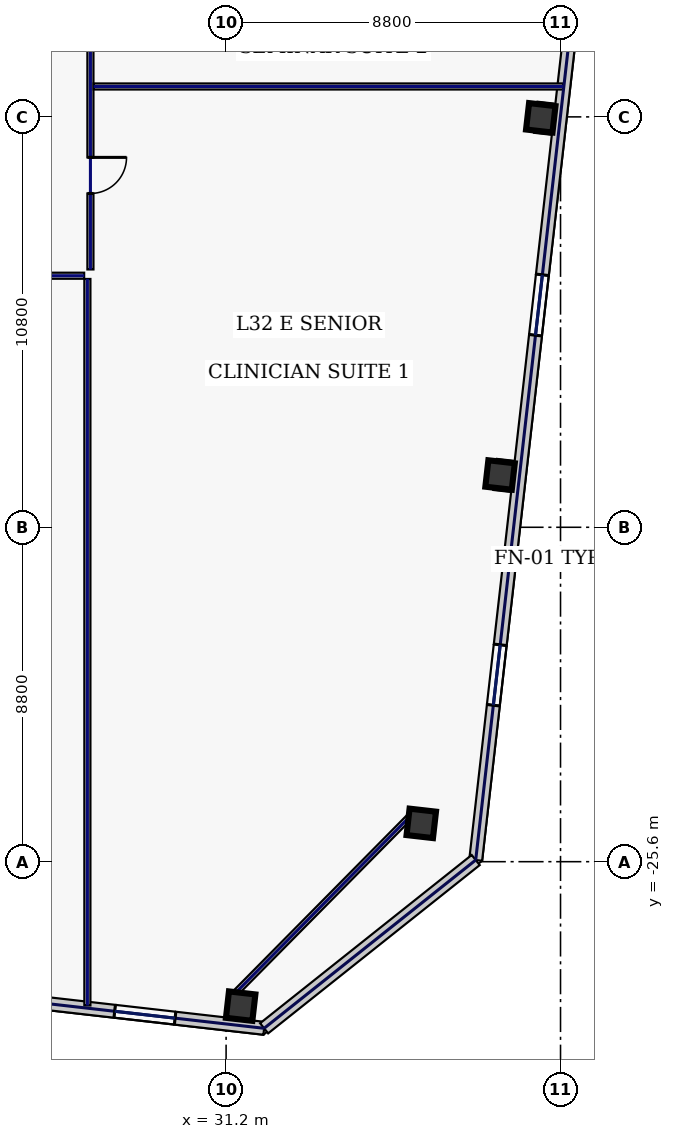
"""IFC4 building model, lengths in metres.
Left out: names, types, materials, properties, quantities, classifications, styles, units other than length and angle.
Written with IfcOpenShell. Run it as: python <this file> out.ifc"""

import sys

from ifc_helpers import new_model, si_unit, direction, frame, frame_2d, origin, origin_2d, place, context, subcontext, project, spatial, rectangle, hollow_rectangle, extrude, element, fill, save


model = new_model("IFC4")
c1 = context("Model", 3, precision=1e-05, world=origin(), true_north=direction((0.0, 1.0)))
c2 = subcontext(c1, "Body", "Model", "MODEL_VIEW")
j1 = project(units=[si_unit("LENGTHUNIT", "METRE"), si_unit("PLANEANGLEUNIT", "RADIAN")], contexts=[c1])
p1 = place(None, origin())
s1 = spatial("IfcSite", under=j1, at=p1, CompositionType="ELEMENT")
p2 = place(p1, origin())
s2 = spatial("IfcBuilding", under=s1, at=p2, CompositionType="ELEMENT")
p3 = place(p2, frame((0.0, 0.0, 141.4)))
s3 = spatial("IfcBuildingStorey", under=s2, at=p3, CompositionType="ELEMENT", Elevation=141.4)
for number, where, z_axis, x_axis in (
    (1, (31.583, -29.401, 0.0), (0.0, 0.0, 1.0), (0.994, -0.113, 0.0)),
    (2, (36.336, -24.592, 0.0), (0.0, 0.0, 1.0), (0.994, -0.113, 0.0)),
    (3, (38.409, -15.424, 0.0), (0.0, 0.0, 1.0), (0.994, -0.113, 0.0)),
    (4, (39.48, -6.025, 0.0), (0.0, 0.0, 1.0), (0.994, -0.113, 0.0)),
):
    element("IfcColumn", number, at=place(p3, frame(where, z_axis=z_axis, x_axis=x_axis)), inside=s3, PredefinedType="COLUMN", context=c2, shape_type="SweptSolid", body=[
        extrude(hollow_rectangle(XDim=0.7, YDim=0.7, WallThickness=0.032, at=origin_2d()), origin(), (0.0, 0.0, 1.0), 4.48),
    ])
p4 = place(p3, frame((11.81, -27.662, 0.0), z_axis=(0.0, 0.0, 1.0), x_axis=(0.993573214953, -0.113191282914, 0.0)))
e5 = element("IfcWall", 5, at=p4, inside=s3, PredefinedType="STANDARD", context=c2, shape_type="SweptSolid", body=[
    extrude(rectangle(XDim=20.523, YDim=0.34, at=frame_2d((10.261, 0.0))), origin(), (0.0, 0.0, 1.0), 4.48),
])
p5 = place(p4, frame((3.167, 0.0, 0.22)))
e6 = element("IfcOpeningElement", 6, at=p5, cuts=e5, PredefinedType="OPENING", context=c2, shape_type="SweptSolid", body=[
    extrude(rectangle(XDim=1.6, YDim=1.2, at=frame_2d((0.8, 0.6))), frame((0.0, 0.18, 0.0), z_axis=(0.0, -1.0, 0.0), x_axis=(1.0, 0.0, 0.0)), (0.0, 0.0, 1.0), 0.36),
])
p6 = place(p4, frame((12.344, 0.0, 0.22)))
e7 = element("IfcOpeningElement", 7, at=p6, cuts=e5, PredefinedType="OPENING", context=c2, shape_type="SweptSolid", body=[
    extrude(rectangle(XDim=1.6, YDim=1.2, at=frame_2d((0.8, 0.6))), frame((0.0, 0.18, 0.0), z_axis=(0.0, -1.0, 0.0), x_axis=(1.0, 0.0, 0.0)), (0.0, 0.0, 1.0), 0.36),
])
p7 = place(p4, frame((16.565, 0.0, 0.22)))
e8 = element("IfcOpeningElement", 8, at=p7, cuts=e5, PredefinedType="OPENING", context=c2, shape_type="SweptSolid", body=[
    extrude(rectangle(XDim=1.6, YDim=1.2, at=frame_2d((0.8, 0.6))), frame((0.0, 0.18, 0.0), z_axis=(0.0, -1.0, 0.0), x_axis=(1.0, 0.0, 0.0)), (0.0, 0.0, 1.0), 0.36),
])
p8 = place(p3, frame((37.768, -25.556, 0.0), z_axis=(0.0, 0.0, 1.0), x_axis=(0.113201605824, 0.993572038877, 0.0)))
e9 = element("IfcWall", 9, at=p8, inside=s3, PredefinedType="STANDARD", context=c2, shape_type="SweptSolid", body=[
    extrude(rectangle(XDim=39.2, YDim=0.34, at=frame_2d((19.6, 0.0))), origin(), (0.0, 0.0, 1.0), 4.48),
])
p9 = place(p8, frame((4.1, 0.0, 0.22)))
e10 = element("IfcOpeningElement", 10, at=p9, cuts=e9, PredefinedType="OPENING", context=c2, shape_type="SweptSolid", body=[
    extrude(rectangle(XDim=1.6, YDim=1.2, at=frame_2d((0.8, 0.6))), frame((0.0, 0.18, 0.0), z_axis=(0.0, -1.0, 0.0), x_axis=(1.0, 0.0, 0.0)), (0.0, 0.0, 1.0), 0.36),
])
p10 = place(p8, frame((13.9, 0.0, 0.22)))
e11 = element("IfcOpeningElement", 11, at=p10, cuts=e9, PredefinedType="OPENING", context=c2, shape_type="SweptSolid", body=[
    extrude(rectangle(XDim=1.6, YDim=1.2, at=frame_2d((0.8, 0.6))), frame((0.0, 0.18, 0.0), z_axis=(0.0, -1.0, 0.0), x_axis=(1.0, 0.0, 0.0)), (0.0, 0.0, 1.0), 0.36),
])
p11 = place(p8, frame((33.5, 0.0, 0.22)))
e12 = element("IfcOpeningElement", 12, at=p11, cuts=e9, PredefinedType="OPENING", context=c2, shape_type="SweptSolid", body=[
    extrude(rectangle(XDim=1.6, YDim=1.2, at=frame_2d((0.8, 0.6))), frame((0.0, 0.18, 0.0), z_axis=(0.0, -1.0, 0.0), x_axis=(1.0, 0.0, 0.0)), (0.0, 0.0, 1.0), 0.36),
])
p12 = place(p3, frame((32.201, -29.985, 0.0), z_axis=(0.0, 0.0, 1.0), x_axis=(0.78261359446, 0.622507800567, 0.0)))
e13 = element("IfcWall", 13, at=p12, inside=s3, PredefinedType="STANDARD", context=c2, shape_type="SweptSolid", body=[
    extrude(rectangle(XDim=7.114, YDim=0.34, at=frame_2d((3.557, 0.0))), origin(), (0.0, 0.0, 1.0), 4.48),
])
p13 = place(p3, frame((31.341, -29.162, 0.0), z_axis=(0.0, 0.0, 1.0), x_axis=(0.702905898933, 0.711282853192, 0.0)))
e14 = element("IfcWall", 14, at=p13, inside=s3, PredefinedType="PARTITIONING", context=c2, shape_type="SweptSolid", body=[
    extrude(rectangle(XDim=6.761, YDim=0.16, at=frame_2d((3.381, 0.0))), origin(), (0.0, 0.0, 1.0), 2.275),
])
p14 = place(p3, frame((27.63, 10.115, 0.0), z_axis=(0.0, 0.0, 1.0), x_axis=(0.0, -1.0, 0.0)))
e15 = element("IfcWall", 15, at=p14, inside=s3, PredefinedType="PARTITIONING", context=c2, shape_type="SweptSolid", body=[
    extrude(rectangle(XDim=20.13, YDim=0.16, at=frame_2d((10.065, 0.0))), origin(), (0.0, 0.0, 1.0), 4.48),
])
p15 = place(p14, frame((17.181, 0.0, 0.0)))
e16 = element("IfcOpeningElement", 16, at=p15, cuts=e15, PredefinedType="OPENING", context=c2, shape_type="SweptSolid", body=[
    extrude(rectangle(XDim=0.95, YDim=2.2, at=frame_2d((0.475, 1.1))), frame((0.0, 0.09, 0.0), z_axis=(0.0, -1.0, 0.0), x_axis=(1.0, 0.0, 0.0)), (0.0, 0.0, 1.0), 0.18),
])
p16 = place(p14, frame((12.95, 0.0, 0.0)))
e17 = element("IfcOpeningElement", 17, at=p16, cuts=e15, PredefinedType="OPENING", context=c2, shape_type="SweptSolid", body=[
    extrude(rectangle(XDim=0.95, YDim=2.2, at=frame_2d((0.475, 1.1))), frame((0.0, 0.09, 0.0), z_axis=(0.0, -1.0, 0.0), x_axis=(1.0, 0.0, 0.0)), (0.0, 0.0, 1.0), 0.18),
])
p17 = place(p14, frame((7.45, 0.0, 0.0)))
e18 = element("IfcOpeningElement", 18, at=p17, cuts=e15, PredefinedType="OPENING", context=c2, shape_type="SweptSolid", body=[
    extrude(rectangle(XDim=0.95, YDim=2.2, at=frame_2d((0.475, 1.1))), frame((0.0, 0.09, 0.0), z_axis=(0.0, -1.0, 0.0), x_axis=(1.0, 0.0, 0.0)), (0.0, 0.0, 1.0), 0.18),
])
p18 = place(p14, frame((2.219, 0.0, 0.0)))
e19 = element("IfcOpeningElement", 19, at=p18, cuts=e15, PredefinedType="OPENING", context=c2, shape_type="SweptSolid", body=[
    extrude(rectangle(XDim=0.95, YDim=2.2, at=frame_2d((0.475, 1.1))), frame((0.0, 0.09, 0.0), z_axis=(0.0, -1.0, 0.0), x_axis=(1.0, 0.0, 0.0)), (0.0, 0.0, 1.0), 0.18),
])
p19 = place(p3, frame((27.465, -10.18, 0.0), z_axis=(0.0, 0.0, 1.0), x_axis=(-1.0, 0.0, 0.0)))
e20 = element("IfcWall", 20, at=p19, inside=s3, PredefinedType="PARTITIONING", context=c2, shape_type="SweptSolid", body=[
    extrude(rectangle(XDim=54.93, YDim=0.16, at=frame_2d((27.465, 0.0))), origin(), (0.0, 0.0, 1.0), 4.48),
])
p20 = place(p19, frame((51.931, 0.0, 0.0)))
e21 = element("IfcOpeningElement", 21, at=p20, cuts=e20, PredefinedType="OPENING", context=c2, shape_type="SweptSolid", body=[
    extrude(rectangle(XDim=1.3, YDim=2.2, at=frame_2d((0.65, 1.1))), frame((0.0, 0.09, 0.0), z_axis=(0.0, -1.0, 0.0), x_axis=(1.0, 0.0, 0.0)), (0.0, 0.0, 1.0), 0.18),
])
p21 = place(p19, frame((45.225, 0.0, 0.0)))
e22 = element("IfcOpeningElement", 22, at=p21, cuts=e20, PredefinedType="OPENING", context=c2, shape_type="SweptSolid", body=[
    extrude(rectangle(XDim=0.95, YDim=2.2, at=frame_2d((0.475, 1.1))), frame((0.0, 0.09, 0.0), z_axis=(0.0, -1.0, 0.0), x_axis=(1.0, 0.0, 0.0)), (0.0, 0.0, 1.0), 0.18),
])
p22 = place(p19, frame((36.525, 0.0, 0.0)))
e23 = element("IfcOpeningElement", 23, at=p22, cuts=e20, PredefinedType="OPENING", context=c2, shape_type="SweptSolid", body=[
    extrude(rectangle(XDim=0.95, YDim=2.2, at=frame_2d((0.475, 1.1))), frame((0.0, 0.09, 0.0), z_axis=(0.0, -1.0, 0.0), x_axis=(1.0, 0.0, 0.0)), (0.0, 0.0, 1.0), 0.18),
])
p23 = place(p19, frame((28.125, 0.0, 0.0)))
e24 = element("IfcOpeningElement", 24, at=p23, cuts=e20, PredefinedType="OPENING", context=c2, shape_type="SweptSolid", body=[
    extrude(rectangle(XDim=0.95, YDim=2.2, at=frame_2d((0.475, 1.1))), frame((0.0, 0.09, 0.0), z_axis=(0.0, -1.0, 0.0), x_axis=(1.0, 0.0, 0.0)), (0.0, 0.0, 1.0), 0.18),
])
p24 = place(p19, frame((19.325, 0.0, 0.0)))
e25 = element("IfcOpeningElement", 25, at=p24, cuts=e20, PredefinedType="OPENING", context=c2, shape_type="SweptSolid", body=[
    extrude(rectangle(XDim=0.95, YDim=2.2, at=frame_2d((0.475, 1.1))), frame((0.0, 0.09, 0.0), z_axis=(0.0, -1.0, 0.0), x_axis=(1.0, 0.0, 0.0)), (0.0, 0.0, 1.0), 0.18),
])
p25 = place(p19, frame((10.75, 0.0, 0.0)))
e26 = element("IfcOpeningElement", 26, at=p25, cuts=e20, PredefinedType="OPENING", context=c2, shape_type="SweptSolid", body=[
    extrude(rectangle(XDim=1.3, YDim=2.2, at=frame_2d((0.65, 1.1))), frame((0.0, 0.09, 0.0), z_axis=(0.0, -1.0, 0.0), x_axis=(1.0, 0.0, 0.0)), (0.0, 0.0, 1.0), 0.18),
])
p26 = place(p19, frame((3.394, 0.0, 0.0)))
e27 = element("IfcOpeningElement", 27, at=p26, cuts=e20, PredefinedType="OPENING", context=c2, shape_type="SweptSolid", body=[
    extrude(rectangle(XDim=1.15, YDim=2.2, at=frame_2d((0.575, 1.1))), frame((0.0, 0.09, 0.0), z_axis=(0.0, -1.0, 0.0), x_axis=(1.0, 0.0, 0.0)), (0.0, 0.0, 1.0), 0.18),
])
p27 = place(p3, frame((27.55, -29.385, 0.0), z_axis=(0.0, 0.0, 1.0), x_axis=(0.0, 1.0, 0.0)))
e28 = element("IfcWall", 28, at=p27, inside=s3, PredefinedType="PARTITIONING", context=c2, shape_type="SweptSolid", body=[
    extrude(rectangle(XDim=19.12, YDim=0.16, at=frame_2d((9.56, 0.0))), origin(), (0.0, 0.0, 1.0), 4.48),
])
p28 = place(p3, frame((27.715, -5.2, 0.0), z_axis=(0.0, 0.0, 1.0), x_axis=(1.0, 0.0, 0.0)))
e29 = element("IfcWall", 29, at=p28, inside=s3, PredefinedType="PARTITIONING", context=c2, shape_type="SweptSolid", body=[
    extrude(rectangle(XDim=12.352, YDim=0.16, at=frame_2d((6.176, 0.0))), origin(), (0.0, 0.0, 1.0), 4.48),
])
p29 = place(p7, origin())
e30 = element("IfcWindow", 30, at=p29, inside=s3, PartitioningType="SINGLE_PANEL", PredefinedType="WINDOW", context=c2, shape_type="SweptSolid", body=[
    extrude(rectangle(XDim=1.6, YDim=1.2, at=frame_2d((0.8, 0.6))), frame((0.0, 0.03, 0.0), z_axis=(0.0, -1.0, 0.0), x_axis=(1.0, 0.0, 0.0)), (0.0, 0.0, 1.0), 0.06),
])
fill(e8, e30)
p30 = place(p9, origin())
e31 = element("IfcWindow", 31, at=p30, inside=s3, PartitioningType="SINGLE_PANEL", PredefinedType="WINDOW", context=c2, shape_type="SweptSolid", body=[
    extrude(rectangle(XDim=1.6, YDim=1.2, at=frame_2d((0.8, 0.6))), frame((0.0, 0.03, 0.0), z_axis=(0.0, -1.0, 0.0), x_axis=(1.0, 0.0, 0.0)), (0.0, 0.0, 1.0), 0.06),
])
fill(e10, e31)
p31 = place(p10, origin())
e32 = element("IfcWindow", 32, at=p31, inside=s3, PartitioningType="SINGLE_PANEL", PredefinedType="WINDOW", context=c2, shape_type="SweptSolid", body=[
    extrude(rectangle(XDim=1.6, YDim=1.2, at=frame_2d((0.8, 0.6))), frame((0.0, 0.03, 0.0), z_axis=(0.0, -1.0, 0.0), x_axis=(1.0, 0.0, 0.0)), (0.0, 0.0, 1.0), 0.06),
])
fill(e11, e32)
p32 = place(p15, origin())
e33 = element("IfcDoor", 33, at=p32, inside=s3, OperationType="SINGLE_SWING_LEFT", PredefinedType="DOOR", context=c2, shape_type="SweptSolid", body=[
    extrude(rectangle(XDim=0.95, YDim=2.2, at=frame_2d((0.475, 1.1))), frame((0.0, 0.025, 0.0), z_axis=(0.0, -1.0, 0.0), x_axis=(1.0, 0.0, 0.0)), (0.0, 0.0, 1.0), 0.05),
])
fill(e16, e33)
save(model, sys.argv[1])
